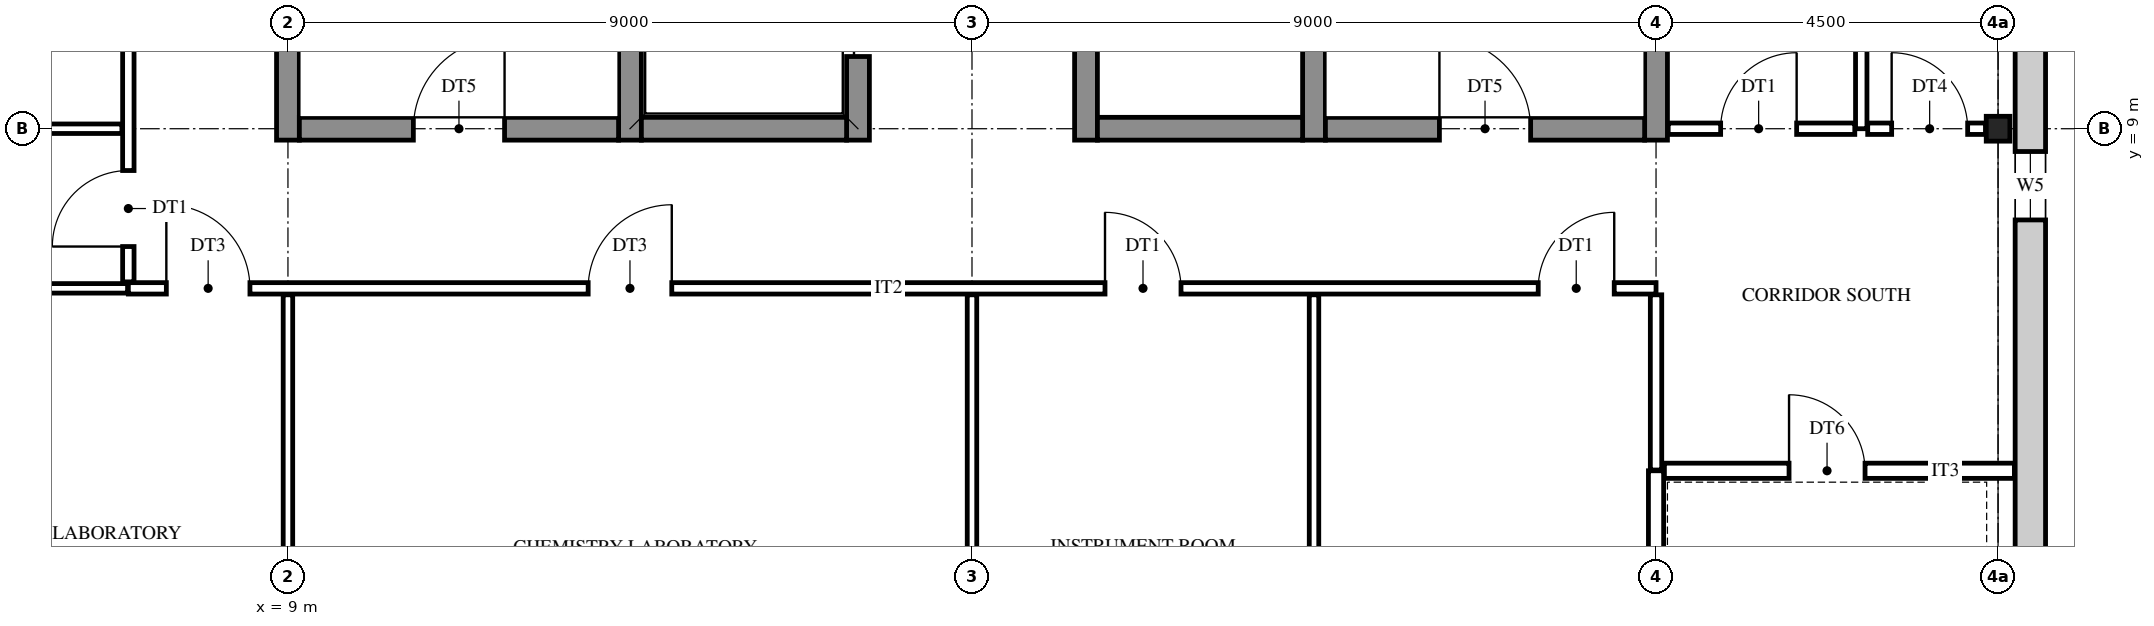
"""IFC4 building model, lengths in metres.
Left out: names, types, materials, properties, quantities, classifications, styles, units other than length and angle.
Written with IfcOpenShell. Run it as: python <this file> out.ifc"""

import sys

from ifc_helpers import new_model, si_unit, direction, frame, frame_2d, origin, origin_2d, place, context, subcontext, project, spatial, rectangle, i_section, extrude, element, fill, save


model = new_model("IFC4")
c1 = context("Model", 3, precision=1e-05, world=origin(), true_north=direction((0.0, 1.0)))
c2 = subcontext(c1, "Body", "Model", "MODEL_VIEW")
j1 = project(units=[si_unit("LENGTHUNIT", "METRE"), si_unit("PLANEANGLEUNIT", "RADIAN")], contexts=[c1])
p1 = place(None, origin())
s1 = spatial("IfcSite", under=j1, at=p1, CompositionType="ELEMENT")
p2 = place(p1, origin())
s2 = spatial("IfcBuilding", under=s1, at=p2, CompositionType="ELEMENT")
p3 = place(p2, frame((0.0, 0.0, 40.2)))
s3 = spatial("IfcBuildingStorey", under=s2, at=p3, CompositionType="ELEMENT", Elevation=40.2)
p4 = place(p3, frame((31.5, 9.0, 0.0), z_axis=(0.0, 0.0, 1.0), x_axis=(1.0, 0.0, 0.0)))
e1 = element("IfcColumn", 1, at=p4, inside=s3, PredefinedType="COLUMN", context=c2, shape_type="SweptSolid", body=[
    extrude(i_section(OverallWidth=0.311, OverallDepth=0.327, WebThickness=0.016, FlangeThickness=0.025, FilletRadius=0.017, at=origin_2d()), origin(), (0.0, 0.0, 1.0), 4.2),
])
for number, where, z_axis, x_axis in (
    (2, (9.0, 8.85, 0.0), (0.0, 0.0, 1.0), (0.0, 1.0, 0.0)),
    (3, (13.5, 8.85, 0.0), (0.0, 0.0, 1.0), (0.0, 1.0, 0.0)),
):
    element("IfcWall", number, at=place(p3, frame(where, z_axis=z_axis, x_axis=x_axis)), inside=s3, PredefinedType="SHEAR", context=c2, shape_type="SweptSolid", body=[
        extrude(rectangle(XDim=9.3, YDim=0.3, at=frame_2d((4.65, 0.0))), origin(), (0.0, 0.0, 1.0), 4.2),
    ])
p5 = place(p3, frame((16.5, 8.85, 0.0), z_axis=(0.0, 0.0, 1.0), x_axis=(0.0, 1.0, 0.0)))
e4 = element("IfcWall", 4, at=p5, inside=s3, PredefinedType="SHEAR", context=c2, shape_type="SweptSolid", body=[
    extrude(rectangle(XDim=9.3, YDim=0.3, at=frame_2d((4.65, 0.0))), origin(), (0.0, 0.0, 1.0), 4.2),
])
p6 = place(p5, frame((1.1, 0.0, 0.0)))
e5 = element("IfcOpeningElement", 5, at=p6, cuts=e4, PredefinedType="OPENING", context=c2, shape_type="SweptSolid", body=[
    extrude(rectangle(XDim=1.1, YDim=2.1, at=frame_2d((0.55, 1.05))), frame((0.0, 0.16, 0.0), z_axis=(0.0, -1.0, 0.0), x_axis=(1.0, 0.0, 0.0)), (0.0, 0.0, 1.0), 0.32),
])
p7 = place(p5, frame((4.1, 0.0, 0.0)))
e6 = element("IfcOpeningElement", 6, at=p7, cuts=e4, PredefinedType="OPENING", context=c2, shape_type="SweptSolid", body=[
    extrude(rectangle(XDim=1.1, YDim=2.1, at=frame_2d((0.55, 1.05))), frame((0.0, 0.16, 0.0), z_axis=(0.0, -1.0, 0.0), x_axis=(1.0, 0.0, 0.0)), (0.0, 0.0, 1.0), 0.32),
])
p8 = place(p3, frame((19.5, 8.85, 0.0), z_axis=(0.0, 0.0, 1.0), x_axis=(0.0, 1.0, 0.0)))
e7 = element("IfcWall", 7, at=p8, inside=s3, PredefinedType="SHEAR", context=c2, shape_type="SweptSolid", body=[
    extrude(rectangle(XDim=9.3, YDim=0.3, at=frame_2d((4.65, 0.0))), origin(), (0.0, 0.0, 1.0), 4.2),
])
p9 = place(p8, frame((3.95, 0.0, 0.0)))
e8 = element("IfcOpeningElement", 8, at=p9, cuts=e7, PredefinedType="OPENING", context=c2, shape_type="SweptSolid", body=[
    extrude(rectangle(XDim=1.4, YDim=2.1, at=frame_2d((0.7, 1.05))), frame((0.0, 0.16, 0.0), z_axis=(0.0, -1.0, 0.0), x_axis=(1.0, 0.0, 0.0)), (0.0, 0.0, 1.0), 0.32),
])
p10 = place(p8, frame((7.1, 0.0, 0.0)))
e9 = element("IfcOpeningElement", 9, at=p10, cuts=e7, PredefinedType="OPENING", context=c2, shape_type="SweptSolid", body=[
    extrude(rectangle(XDim=1.1, YDim=2.1, at=frame_2d((0.55, 1.05))), frame((0.0, 0.16, 0.0), z_axis=(0.0, -1.0, 0.0), x_axis=(1.0, 0.0, 0.0)), (0.0, 0.0, 1.0), 0.32),
])
for number, where, z_axis, x_axis in (
    (10, (22.5, 8.85, 0.0), (0.0, 0.0, 1.0), (0.0, 1.0, 0.0)),
    (11, (27.0, 8.85, 0.0), (0.0, 0.0, 1.0), (0.0, 1.0, 0.0)),
):
    element("IfcWall", number, at=place(p3, frame(where, z_axis=z_axis, x_axis=x_axis)), inside=s3, PredefinedType="SHEAR", context=c2, shape_type="SweptSolid", body=[
        extrude(rectangle(XDim=9.3, YDim=0.3, at=frame_2d((4.65, 0.0))), origin(), (0.0, 0.0, 1.0), 4.2),
    ])
p11 = place(p3, frame((9.15, 9.0, 0.0), z_axis=(0.0, 0.0, 1.0), x_axis=(1.0, 0.0, 0.0)))
e12 = element("IfcWall", 12, at=p11, inside=s3, PredefinedType="SHEAR", context=c2, shape_type="SweptSolid", body=[
    extrude(rectangle(XDim=4.2, YDim=0.3, at=frame_2d((2.1, 0.0))), origin(), (0.0, 0.0, 1.0), 4.2),
])
p12 = place(p11, frame((1.5, 0.0, 0.0)))
e13 = element("IfcOpeningElement", 13, at=p12, cuts=e12, PredefinedType="OPENING", context=c2, shape_type="SweptSolid", body=[
    extrude(rectangle(XDim=1.2, YDim=2.1, at=frame_2d((0.6, 1.05))), frame((0.0, 0.16, 0.0), z_axis=(0.0, -1.0, 0.0), x_axis=(1.0, 0.0, 0.0)), (0.0, 0.0, 1.0), 0.32),
])
for number, where, z_axis, x_axis in (
    (14, (13.65, 9.0, 0.0), (0.0, 0.0, 1.0), (1.0, 0.0, 0.0)),
    (15, (19.65, 9.0, 0.0), (0.0, 0.0, 1.0), (1.0, 0.0, 0.0)),
):
    element("IfcWall", number, at=place(p3, frame(where, z_axis=z_axis, x_axis=x_axis)), inside=s3, PredefinedType="SHEAR", context=c2, shape_type="SweptSolid", body=[
        extrude(rectangle(XDim=2.7, YDim=0.3, at=frame_2d((1.35, 0.0))), origin(), (0.0, 0.0, 1.0), 4.2),
    ])
p13 = place(p3, frame((22.65, 9.0, 0.0), z_axis=(0.0, 0.0, 1.0), x_axis=(1.0, 0.0, 0.0)))
e16 = element("IfcWall", 16, at=p13, inside=s3, PredefinedType="SHEAR", context=c2, shape_type="SweptSolid", body=[
    extrude(rectangle(XDim=4.2, YDim=0.3, at=frame_2d((2.1, 0.0))), origin(), (0.0, 0.0, 1.0), 4.2),
])
p14 = place(p13, frame((1.5, 0.0, 0.0)))
e17 = element("IfcOpeningElement", 17, at=p14, cuts=e16, PredefinedType="OPENING", context=c2, shape_type="SweptSolid", body=[
    extrude(rectangle(XDim=1.2, YDim=2.1, at=frame_2d((0.6, 1.05))), frame((0.0, 0.16, 0.0), z_axis=(0.0, -1.0, 0.0), x_axis=(1.0, 0.0, 0.0)), (0.0, 0.0, 1.0), 0.32),
])
p15 = place(p3, frame((31.925, 27.225, 0.0), z_axis=(0.0, 0.0, 1.0), x_axis=(0.0, -1.0, 0.0)))
e18 = element("IfcWall", 18, at=p15, inside=s3, PredefinedType="STANDARD", context=c2, shape_type="SweptSolid", body=[
    extrude(rectangle(XDim=27.45, YDim=0.4, at=frame_2d((13.725, 0.0))), origin(), (0.0, 0.0, 1.0), 4.2),
])
p16 = place(p15, frame((26.025, 0.0, 0.9)))
e19 = element("IfcOpeningElement", 19, at=p16, cuts=e18, PredefinedType="OPENING", context=c2, shape_type="SweptSolid", body=[
    extrude(rectangle(XDim=0.9, YDim=2.0, at=frame_2d((0.45, 1.0))), frame((0.0, 0.21, 0.0), z_axis=(0.0, -1.0, 0.0), x_axis=(1.0, 0.0, 0.0)), (0.0, 0.0, 1.0), 0.42),
])
p17 = place(p15, frame((18.525, 0.0, 0.9)))
e20 = element("IfcOpeningElement", 20, at=p17, cuts=e18, PredefinedType="OPENING", context=c2, shape_type="SweptSolid", body=[
    extrude(rectangle(XDim=0.9, YDim=2.0, at=frame_2d((0.45, 1.0))), frame((0.0, 0.21, 0.0), z_axis=(0.0, -1.0, 0.0), x_axis=(1.0, 0.0, 0.0)), (0.0, 0.0, 1.0), 0.42),
])
p18 = place(p15, frame((15.675, 0.0, 1.6)))
e21 = element("IfcOpeningElement", 21, at=p18, cuts=e18, PredefinedType="OPENING", context=c2, shape_type="SweptSolid", body=[
    extrude(rectangle(XDim=0.6, YDim=0.9, at=frame_2d((0.3, 0.45))), frame((0.0, 0.21, 0.0), z_axis=(0.0, -1.0, 0.0), x_axis=(1.0, 0.0, 0.0)), (0.0, 0.0, 1.0), 0.42),
])
p19 = place(p15, frame((11.175, 0.0, 1.6)))
e22 = element("IfcOpeningElement", 22, at=p19, cuts=e18, PredefinedType="OPENING", context=c2, shape_type="SweptSolid", body=[
    extrude(rectangle(XDim=0.6, YDim=0.9, at=frame_2d((0.3, 0.45))), frame((0.0, 0.21, 0.0), z_axis=(0.0, -1.0, 0.0), x_axis=(1.0, 0.0, 0.0)), (0.0, 0.0, 1.0), 0.42),
])
p20 = place(p15, frame((8.025, 0.0, 0.9)))
e23 = element("IfcOpeningElement", 23, at=p20, cuts=e18, PredefinedType="OPENING", context=c2, shape_type="SweptSolid", body=[
    extrude(rectangle(XDim=0.9, YDim=2.0, at=frame_2d((0.45, 1.0))), frame((0.0, 0.21, 0.0), z_axis=(0.0, -1.0, 0.0), x_axis=(1.0, 0.0, 0.0)), (0.0, 0.0, 1.0), 0.42),
])
p21 = place(p15, frame((0.525, 0.0, 0.9)))
e24 = element("IfcOpeningElement", 24, at=p21, cuts=e18, PredefinedType="OPENING", context=c2, shape_type="SweptSolid", body=[
    extrude(rectangle(XDim=0.9, YDim=2.0, at=frame_2d((0.45, 1.0))), frame((0.0, 0.21, 0.0), z_axis=(0.0, -1.0, 0.0), x_axis=(1.0, 0.0, 0.0)), (0.0, 0.0, 1.0), 0.42),
])
p22 = place(p3, frame((6.9, 6.985, 0.0), z_axis=(0.0, 0.0, 1.0), x_axis=(0.0, 1.0, 0.0)))
e25 = element("IfcWall", 25, at=p22, inside=s3, PredefinedType="PARTITIONING", context=c2, shape_type="SweptSolid", body=[
    extrude(rectangle(XDim=13.03, YDim=0.15, at=frame_2d((6.515, 0.0))), origin(), (0.0, 0.0, 1.0), 3.537),
])
p23 = place(p22, frame((0.465, 0.0, 0.0)))
e26 = element("IfcOpeningElement", 26, at=p23, cuts=e25, PredefinedType="OPENING", context=c2, shape_type="SweptSolid", body=[
    extrude(rectangle(XDim=1.0, YDim=2.1, at=frame_2d((0.5, 1.05))), frame((0.0, 0.085, 0.0), z_axis=(0.0, -1.0, 0.0), x_axis=(1.0, 0.0, 0.0)), (0.0, 0.0, 1.0), 0.17),
])
p24 = place(p22, frame((3.715, 0.0, 0.0)))
e27 = element("IfcOpeningElement", 27, at=p24, cuts=e25, PredefinedType="OPENING", context=c2, shape_type="SweptSolid", body=[
    extrude(rectangle(XDim=1.1, YDim=2.1, at=frame_2d((0.55, 1.05))), frame((0.0, 0.085, 0.0), z_axis=(0.0, -1.0, 0.0), x_axis=(1.0, 0.0, 0.0)), (0.0, 0.0, 1.0), 0.17),
])
p25 = place(p22, frame((8.265, 0.0, 0.0)))
e28 = element("IfcOpeningElement", 28, at=p25, cuts=e25, PredefinedType="OPENING", context=c2, shape_type="SweptSolid", body=[
    extrude(rectangle(XDim=1.0, YDim=2.1, at=frame_2d((0.5, 1.05))), frame((0.0, 0.085, 0.0), z_axis=(0.0, -1.0, 0.0), x_axis=(1.0, 0.0, 0.0)), (0.0, 0.0, 1.0), 0.17),
])
for number, where, z_axis, x_axis in (
    (29, (9.0, 0.174, 0.0), (0.0, 0.0, 1.0), (0.0, 1.0, 0.0)),
    (30, (18.0, 0.174, 0.0), (0.0, 0.0, 1.0), (0.0, 1.0, 0.0)),
):
    element("IfcWall", number, at=place(p3, frame(where, z_axis=z_axis, x_axis=x_axis)), inside=s3, PredefinedType="PARTITIONING", context=c2, shape_type="SweptSolid", body=[
        extrude(rectangle(XDim=6.641, YDim=0.125, at=frame_2d((3.321, 0.0))), origin(), (0.0, 0.0, 1.0), 3.537),
    ])
p26 = place(p3, frame((22.5, -0.226, 0.0), z_axis=(0.0, 0.0, 1.0), x_axis=(0.0, 1.0, 0.0)))
e31 = element("IfcWall", 31, at=p26, inside=s3, PredefinedType="PARTITIONING", context=c2, shape_type="SweptSolid", body=[
    extrude(rectangle(XDim=7.041, YDim=0.125, at=frame_2d((3.521, 0.0))), origin(), (0.0, 0.0, 1.0), 3.537),
])
p27 = place(p3, frame((27.0, 0.174, 0.0), z_axis=(0.0, 0.0, 1.0), x_axis=(0.0, 1.0, 0.0)))
e32 = element("IfcWall", 32, at=p27, inside=s3, PredefinedType="PARTITIONING", context=c2, shape_type="SweptSolid", body=[
    extrude(rectangle(XDim=4.326, YDim=0.2, at=frame_2d((2.163, 0.0))), origin(), (0.0, 0.0, 1.0), 3.537),
])
p28 = place(p3, frame((27.0, 4.51, 0.0), z_axis=(0.0, 0.0, 1.0), x_axis=(0.0, 1.0, 0.0)))
e33 = element("IfcWall", 33, at=p28, inside=s3, PredefinedType="PARTITIONING", context=c2, shape_type="SweptSolid", body=[
    extrude(rectangle(XDim=2.305, YDim=0.15, at=frame_2d((1.152, 0.0))), origin(), (0.0, 0.0, 1.0), 3.537),
])
p29 = place(p3, frame((29.7, 9.0, 0.0), z_axis=(0.0, 0.0, 1.0), x_axis=(0.0, 1.0, 0.0)))
e34 = element("IfcWall", 34, at=p29, inside=s3, PredefinedType="PARTITIONING", context=c2, shape_type="SweptSolid", body=[
    extrude(rectangle(XDim=6.3, YDim=0.15, at=frame_2d((3.15, 0.0))), origin(), (0.0, 0.0, 1.0), 3.537),
])
p30 = place(p29, frame((4.0, 0.0, 0.0)))
e35 = element("IfcOpeningElement", 35, at=p30, cuts=e34, PredefinedType="OPENING", context=c2, shape_type="SweptSolid", body=[
    extrude(rectangle(XDim=1.0, YDim=2.1, at=frame_2d((0.5, 1.05))), frame((0.0, 0.085, 0.0), z_axis=(0.0, -1.0, 0.0), x_axis=(1.0, 0.0, 0.0)), (0.0, 0.0, 1.0), 0.17),
])
p31 = place(p3, frame((27.11, 4.5, 0.0), z_axis=(0.0, 0.0, 1.0), x_axis=(1.0, 0.0, 0.0)))
e36 = element("IfcWall", 36, at=p31, inside=s3, PredefinedType="PARTITIONING", context=c2, shape_type="SweptSolid", body=[
    extrude(rectangle(XDim=4.605, YDim=0.2, at=frame_2d((2.302, 0.0))), origin(), (0.0, 0.0, 1.0), 3.537),
])
p32 = place(p31, frame((1.64, 0.0, 0.0)))
e37 = element("IfcOpeningElement", 37, at=p32, cuts=e36, PredefinedType="OPENING", context=c2, shape_type="SweptSolid", body=[
    extrude(rectangle(XDim=1.0, YDim=2.1, at=frame_2d((0.5, 1.05))), frame((0.0, 0.11, 0.0), z_axis=(0.0, -1.0, 0.0), x_axis=(1.0, 0.0, 0.0)), (0.0, 0.0, 1.0), 0.22),
])
p33 = place(p3, frame((4.573, 6.9, 0.0), z_axis=(0.0, 0.0, 1.0), x_axis=(1.0, 0.0, 0.0)))
e38 = element("IfcWall", 38, at=p33, inside=s3, PredefinedType="PARTITIONING", context=c2, shape_type="SweptSolid", body=[
    extrude(rectangle(XDim=2.317, YDim=0.125, at=frame_2d((1.159, 0.0))), origin(), (0.0, 0.0, 1.0), 3.537),
])
p34 = place(p3, frame((6.9, 6.9, 0.0), z_axis=(0.0, 0.0, 1.0), x_axis=(1.0, 0.0, 0.0)))
e39 = element("IfcWall", 39, at=p34, inside=s3, PredefinedType="PARTITIONING", context=c2, shape_type="SweptSolid", body=[
    extrude(rectangle(XDim=20.1, YDim=0.15, at=frame_2d((10.05, 0.0))), origin(), (0.0, 0.0, 1.0), 3.537),
])
p35 = place(p34, frame((0.5, 0.0, 0.0)))
e40 = element("IfcOpeningElement", 40, at=p35, cuts=e39, PredefinedType="OPENING", context=c2, shape_type="SweptSolid", body=[
    extrude(rectangle(XDim=1.1, YDim=2.1, at=frame_2d((0.55, 1.05))), frame((0.0, 0.085, 0.0), z_axis=(0.0, -1.0, 0.0), x_axis=(1.0, 0.0, 0.0)), (0.0, 0.0, 1.0), 0.17),
])
p36 = place(p34, frame((6.05, 0.0, 0.0)))
e41 = element("IfcOpeningElement", 41, at=p36, cuts=e39, PredefinedType="OPENING", context=c2, shape_type="SweptSolid", body=[
    extrude(rectangle(XDim=1.1, YDim=2.1, at=frame_2d((0.55, 1.05))), frame((0.0, 0.085, 0.0), z_axis=(0.0, -1.0, 0.0), x_axis=(1.0, 0.0, 0.0)), (0.0, 0.0, 1.0), 0.17),
])
p37 = place(p34, frame((12.85, 0.0, 0.0)))
e42 = element("IfcOpeningElement", 42, at=p37, cuts=e39, PredefinedType="OPENING", context=c2, shape_type="SweptSolid", body=[
    extrude(rectangle(XDim=1.0, YDim=2.1, at=frame_2d((0.5, 1.05))), frame((0.0, 0.085, 0.0), z_axis=(0.0, -1.0, 0.0), x_axis=(1.0, 0.0, 0.0)), (0.0, 0.0, 1.0), 0.17),
])
p38 = place(p34, frame((18.55, 0.0, 0.0)))
e43 = element("IfcOpeningElement", 43, at=p38, cuts=e39, PredefinedType="OPENING", context=c2, shape_type="SweptSolid", body=[
    extrude(rectangle(XDim=1.0, YDim=2.1, at=frame_2d((0.5, 1.05))), frame((0.0, 0.085, 0.0), z_axis=(0.0, -1.0, 0.0), x_axis=(1.0, 0.0, 0.0)), (0.0, 0.0, 1.0), 0.17),
])
p39 = place(p3, frame((0.166, 9.0, 0.0), z_axis=(0.0, 0.0, 1.0), x_axis=(1.0, 0.0, 0.0)))
e44 = element("IfcWall", 44, at=p39, inside=s3, PredefinedType="PARTITIONING", context=c2, shape_type="SweptSolid", body=[
    extrude(rectangle(XDim=6.649, YDim=0.125, at=frame_2d((3.325, 0.0))), origin(), (0.0, 0.0, 1.0), 3.537),
])
p40 = place(p3, frame((27.16, 9.0, 0.0), z_axis=(0.0, 0.0, 1.0), x_axis=(1.0, 0.0, 0.0)))
e45 = element("IfcWall", 45, at=p40, inside=s3, PredefinedType="PARTITIONING", context=c2, shape_type="SweptSolid", body=[
    extrude(rectangle(XDim=2.455, YDim=0.15, at=frame_2d((1.228, 0.0))), origin(), (0.0, 0.0, 1.0), 3.537),
])
p41 = place(p40, frame((0.69, 0.0, 0.0)))
e46 = element("IfcOpeningElement", 46, at=p41, cuts=e45, PredefinedType="OPENING", context=c2, shape_type="SweptSolid", body=[
    extrude(rectangle(XDim=1.0, YDim=2.1, at=frame_2d((0.5, 1.05))), frame((0.0, 0.085, 0.0), z_axis=(0.0, -1.0, 0.0), x_axis=(1.0, 0.0, 0.0)), (0.0, 0.0, 1.0), 0.17),
])
p42 = place(p3, frame((29.785, 9.0, 0.0), z_axis=(0.0, 0.0, 1.0), x_axis=(1.0, 0.0, 0.0)))
e47 = element("IfcWall", 47, at=p42, inside=s3, PredefinedType="PARTITIONING", context=c2, shape_type="SweptSolid", body=[
    extrude(rectangle(XDim=1.55, YDim=0.15, at=frame_2d((0.775, 0.0))), origin(), (0.0, 0.0, 1.0), 3.537),
])
p43 = place(p42, frame((0.315, 0.0, 0.0)))
e48 = element("IfcOpeningElement", 48, at=p43, cuts=e47, PredefinedType="OPENING", context=c2, shape_type="SweptSolid", body=[
    extrude(rectangle(XDim=1.0, YDim=2.1, at=frame_2d((0.5, 1.05))), frame((0.0, 0.085, 0.0), z_axis=(0.0, -1.0, 0.0), x_axis=(1.0, 0.0, 0.0)), (0.0, 0.0, 1.0), 0.17),
])
p44 = place(p17, origin())
e49 = element("IfcWindow", 49, at=p44, inside=s3, PartitioningType="SINGLE_PANEL", PredefinedType="WINDOW", context=c2, shape_type="SweptSolid", body=[
    extrude(rectangle(XDim=0.9, YDim=2.0, at=frame_2d((0.45, 1.0))), frame((0.0, 0.03, 0.0), z_axis=(0.0, -1.0, 0.0), x_axis=(1.0, 0.0, 0.0)), (0.0, 0.0, 1.0), 0.06),
])
fill(e20, e49)
p45 = place(p12, origin())
e50 = element("IfcDoor", 50, at=p45, inside=s3, OperationType="SINGLE_SWING_RIGHT", PredefinedType="DOOR", context=c2, shape_type="SweptSolid", body=[
    extrude(rectangle(XDim=1.2, YDim=2.1, at=frame_2d((0.6, 1.05))), frame((0.0, 0.025, 0.0), z_axis=(0.0, -1.0, 0.0), x_axis=(1.0, 0.0, 0.0)), (0.0, 0.0, 1.0), 0.05),
])
fill(e13, e50)
p46 = place(p14, origin())
e51 = element("IfcDoor", 51, at=p46, inside=s3, OperationType="SINGLE_SWING_LEFT", PredefinedType="DOOR", context=c2, shape_type="SweptSolid", body=[
    extrude(rectangle(XDim=1.2, YDim=2.1, at=frame_2d((0.6, 1.05))), frame((0.0, 0.025, 0.0), z_axis=(0.0, -1.0, 0.0), x_axis=(1.0, 0.0, 0.0)), (0.0, 0.0, 1.0), 0.05),
])
fill(e17, e51)
p47 = place(p41, origin())
e52 = element("IfcDoor", 52, at=p47, inside=s3, OperationType="SINGLE_SWING_RIGHT", PredefinedType="DOOR", context=c2, shape_type="SweptSolid", body=[
    extrude(rectangle(XDim=1.0, YDim=2.1, at=frame_2d((0.5, 1.05))), frame((0.0, 0.025, 0.0), z_axis=(0.0, -1.0, 0.0), x_axis=(1.0, 0.0, 0.0)), (0.0, 0.0, 1.0), 0.05),
])
fill(e46, e52)
p48 = place(p43, origin())
e53 = element("IfcDoor", 53, at=p48, inside=s3, OperationType="SINGLE_SWING_LEFT", PredefinedType="DOOR", context=c2, shape_type="SweptSolid", body=[
    extrude(rectangle(XDim=1.0, YDim=2.1, at=frame_2d((0.5, 1.05))), frame((0.0, 0.025, 0.0), z_axis=(0.0, -1.0, 0.0), x_axis=(1.0, 0.0, 0.0)), (0.0, 0.0, 1.0), 0.05),
])
fill(e48, e53)
p49 = place(p32, frame((1.0, 0.0, 0.0), z_axis=(0.0, 0.0, 1.0), x_axis=(-1.0, 0.0, 0.0)))
e54 = element("IfcDoor", 54, at=p49, inside=s3, OperationType="SINGLE_SWING_LEFT", PredefinedType="DOOR", context=c2, shape_type="SweptSolid", body=[
    extrude(rectangle(XDim=1.0, YDim=2.1, at=frame_2d((0.5, 1.05))), frame((0.0, 0.025, 0.0), z_axis=(0.0, -1.0, 0.0), x_axis=(1.0, 0.0, 0.0)), (0.0, 0.0, 1.0), 0.05),
])
fill(e37, e54)
p50 = place(p23, origin())
e55 = element("IfcDoor", 55, at=p50, inside=s3, OperationType="SINGLE_SWING_LEFT", PredefinedType="DOOR", context=c2, shape_type="SweptSolid", body=[
    extrude(rectangle(XDim=1.0, YDim=2.1, at=frame_2d((0.5, 1.05))), frame((0.0, 0.025, 0.0), z_axis=(0.0, -1.0, 0.0), x_axis=(1.0, 0.0, 0.0)), (0.0, 0.0, 1.0), 0.05),
])
fill(e26, e55)
p51 = place(p35, frame((1.1, 0.0, 0.0), z_axis=(0.0, 0.0, 1.0), x_axis=(-1.0, 0.0, 0.0)))
e56 = element("IfcDoor", 56, at=p51, inside=s3, OperationType="SINGLE_SWING_LEFT", PredefinedType="DOOR", context=c2, shape_type="SweptSolid", body=[
    extrude(rectangle(XDim=1.1, YDim=2.1, at=frame_2d((0.55, 1.05))), frame((0.0, 0.025, 0.0), z_axis=(0.0, -1.0, 0.0), x_axis=(1.0, 0.0, 0.0)), (0.0, 0.0, 1.0), 0.05),
])
fill(e40, e56)
p52 = place(p36, frame((1.1, 0.0, 0.0), z_axis=(0.0, 0.0, 1.0), x_axis=(-1.0, 0.0, 0.0)))
e57 = element("IfcDoor", 57, at=p52, inside=s3, OperationType="SINGLE_SWING_RIGHT", PredefinedType="DOOR", context=c2, shape_type="SweptSolid", body=[
    extrude(rectangle(XDim=1.1, YDim=2.1, at=frame_2d((0.55, 1.05))), frame((0.0, 0.025, 0.0), z_axis=(0.0, -1.0, 0.0), x_axis=(1.0, 0.0, 0.0)), (0.0, 0.0, 1.0), 0.05),
])
fill(e41, e57)
p53 = place(p37, frame((1.0, 0.0, 0.0), z_axis=(0.0, 0.0, 1.0), x_axis=(-1.0, 0.0, 0.0)))
e58 = element("IfcDoor", 58, at=p53, inside=s3, OperationType="SINGLE_SWING_LEFT", PredefinedType="DOOR", context=c2, shape_type="SweptSolid", body=[
    extrude(rectangle(XDim=1.0, YDim=2.1, at=frame_2d((0.5, 1.05))), frame((0.0, 0.025, 0.0), z_axis=(0.0, -1.0, 0.0), x_axis=(1.0, 0.0, 0.0)), (0.0, 0.0, 1.0), 0.05),
])
fill(e42, e58)
p54 = place(p38, frame((1.0, 0.0, 0.0), z_axis=(0.0, 0.0, 1.0), x_axis=(-1.0, 0.0, 0.0)))
e59 = element("IfcDoor", 59, at=p54, inside=s3, OperationType="SINGLE_SWING_RIGHT", PredefinedType="DOOR", context=c2, shape_type="SweptSolid", body=[
    extrude(rectangle(XDim=1.0, YDim=2.1, at=frame_2d((0.5, 1.05))), frame((0.0, 0.025, 0.0), z_axis=(0.0, -1.0, 0.0), x_axis=(1.0, 0.0, 0.0)), (0.0, 0.0, 1.0), 0.05),
])
fill(e43, e59)
p55 = place(p6, origin())
e60 = element("IfcDoor", 60, at=p55, inside=s3, OperationType="DOUBLE_DOOR_SLIDING", PredefinedType="DOOR", context=c2, shape_type="SweptSolid", body=[
    extrude(rectangle(XDim=1.1, YDim=2.1, at=frame_2d((0.55, 1.05))), frame((0.0, 0.025, 0.0), z_axis=(0.0, -1.0, 0.0), x_axis=(1.0, 0.0, 0.0)), (0.0, 0.0, 1.0), 0.05),
])
fill(e5, e60)
save(model, sys.argv[1])
